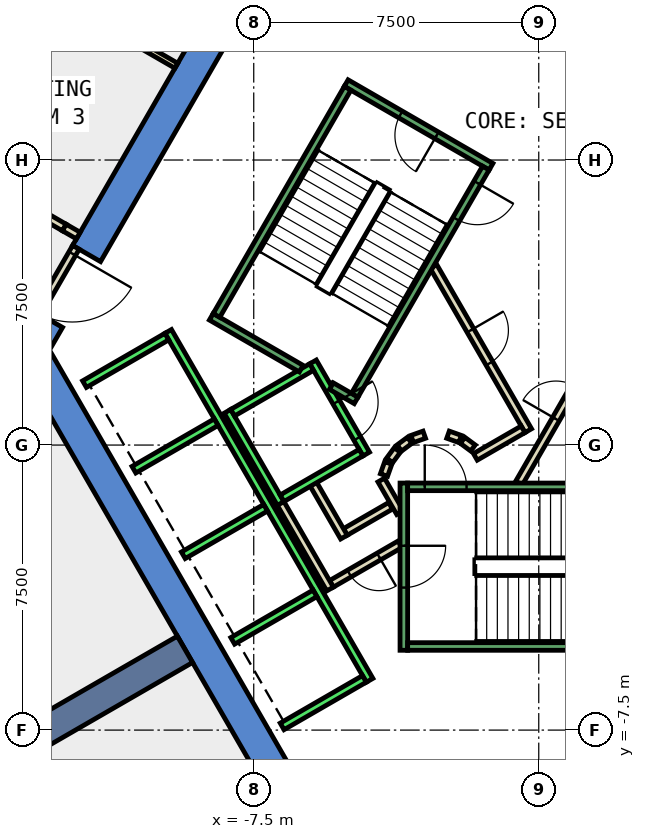
"""IFC4 building model, lengths in metres.
Left out: names, types, materials, properties, quantities, classifications, styles, units other than length and angle.
Written with IfcOpenShell. Run it as: python <this file> out.ifc"""

import sys

from ifc_helpers import new_model, si_unit, direction, frame, frame_2d, origin, place, context, subcontext, project, spatial, polyline, rectangle, outline, extrude, element, fill, save


model = new_model("IFC4")
c1 = context("Model", 3, precision=1e-05, world=origin(), true_north=direction((0.0, 1.0)))
c2 = subcontext(c1, "Body", "Model", "MODEL_VIEW")
j1 = project(units=[si_unit("LENGTHUNIT", "METRE"), si_unit("PLANEANGLEUNIT", "RADIAN")], contexts=[c1])
p1 = place(None, origin())
s1 = spatial("IfcSite", under=j1, at=p1, CompositionType="ELEMENT")
p2 = place(p1, origin())
s2 = spatial("IfcBuilding", under=s1, at=p2, CompositionType="ELEMENT")
p3 = place(p2, frame((0.0, 0.0, 128.6)))
s3 = spatial("IfcBuildingStorey", under=s2, at=p3, CompositionType="ELEMENT", Elevation=128.6)
p4 = place(p3, frame((0.0, 0.0, -0.4)))
e1 = element("IfcWall", 1, at=p4, inside=s3, PredefinedType="SHEAR", context=c2, shape_type="SweptSolid", body=[
    extrude(outline(polyline([(-12.267, 5.252), (-11.531, 4.827), (-6.437, 13.65), (-6.928, 14.5), (-12.267, 5.252)])), origin(), (0.0, 0.0, 1.0), 4.0),
])
p5 = place(p3, frame((0.0, 0.0, -0.4)))
e2 = element("IfcWall", 2, at=p5, inside=s3, PredefinedType="SHEAR", context=c2, shape_type="SweptSolid", body=[
    extrude(outline(polyline([(-12.531, 3.095), (-13.267, 3.52), (-13.856, 2.5), (-12.875, 2.5), (-12.531, 3.095)])), origin(), (0.0, 0.0, 1.0), 4.0),
])
p6 = place(p3, frame((0.0, 0.0, -0.4)))
e3 = element("IfcWall", 3, at=p6, inside=s3, PredefinedType="SHEAR", context=c2, shape_type="SweptSolid", body=[
    extrude(outline(polyline([(-13.856, 2.5), (-6.928, -9.5), (-6.437, -8.65), (-12.875, 2.5), (-13.856, 2.5)])), origin(), (0.0, 0.0, 1.0), 4.0),
])
p7 = place(p3, frame((-9.31, -5.375, -0.4), z_axis=(0.0, 0.0, 1.0), x_axis=(-0.866017533419, -0.500013631625, 0.0)))
e4 = element("IfcWall", 4, at=p7, inside=s3, PredefinedType="SHEAR", context=c2, shape_type="SweptSolid", body=[
    extrude(rectangle(XDim=9.0, YDim=0.8, at=frame_2d((4.5, 0.0))), origin(), (0.0, 0.0, 1.0), 4.0),
])
p8 = place(p3, frame((-16.441, 8.008, 0.0), z_axis=(0.0, 0.0, 1.0), x_axis=(0.866020923391, -0.500007760188, 0.0)))
e5 = element("IfcWall", 5, at=p8, inside=s3, PredefinedType="PARTITIONING", context=c2, shape_type="SweptSolid", body=[
    extrude(rectangle(XDim=4.568, YDim=0.2, at=frame_2d((2.284, 0.0))), origin(), (0.0, 0.0, 1.0), 3.6),
])
p9 = place(p8, frame((1.997, 0.0, 0.0)))
e6 = element("IfcOpeningElement", 6, at=p9, cuts=e5, PredefinedType="OPENING", context=c2, shape_type="SweptSolid", body=[
    extrude(rectangle(XDim=1.0, YDim=2.1, at=frame_2d((0.5, 1.05))), frame((0.0, 0.11, 0.0), z_axis=(0.0, -1.0, 0.0), x_axis=(1.0, 0.0, 0.0)), (0.0, 0.0, 1.0), 0.22),
])
p10 = place(p3, frame((-3.9, -1.599, 0.0), z_axis=(0.0, 0.0, 1.0), x_axis=(-0.865969445389, -0.500096910261, 0.0)))
e7 = element("IfcWall", 7, at=p10, inside=s3, PredefinedType="PARTITIONING", context=c2, shape_type="SweptSolid", body=[
    extrude(rectangle(XDim=1.373, YDim=0.2, at=frame_2d((0.687, 0.0))), origin(), (0.0, 0.0, 1.0), 3.6),
])
p11 = place(p3, frame((-5.126, -2.422, 0.0), z_axis=(0.0, 0.0, 1.0), x_axis=(-0.500062241894, 0.865989465428, 0.0)))
e8 = element("IfcWall", 8, at=p11, inside=s3, PredefinedType="PARTITIONING", context=c2, shape_type="SweptSolid", body=[
    extrude(rectangle(XDim=1.7, YDim=0.2, at=frame_2d((0.85, 0.0))), origin(), (0.0, 0.0, 1.0), 3.6),
])
p12 = place(p3, frame((-3.65, -2.61, 0.0), z_axis=(0.0, 0.0, 1.0), x_axis=(-0.866072462134, -0.499918483688, 0.0)))
e9 = element("IfcWall", 9, at=p12, inside=s3, PredefinedType="PARTITIONING", context=c2, shape_type="SweptSolid", body=[
    extrude(rectangle(XDim=2.084, YDim=0.2, at=frame_2d((1.042, 0.0))), origin(), (0.0, 0.0, 1.0), 3.6),
])
p13 = place(p12, frame((0.642, 0.0, 0.0)))
e10 = element("IfcOpeningElement", 10, at=p13, cuts=e9, PredefinedType="OPENING", context=c2, shape_type="SweptSolid", body=[
    extrude(rectangle(XDim=0.9, YDim=2.1, at=frame_2d((0.45, 1.05))), frame((0.0, 0.11, 0.0), z_axis=(0.0, -1.0, 0.0), x_axis=(1.0, 0.0, 0.0)), (0.0, 0.0, 1.0), 0.22),
])
p14 = place(p3, frame((-5.492, -3.788, 0.0), z_axis=(0.0, 0.0, 1.0), x_axis=(-0.500008949224, 0.866020236886, 0.0)))
e11 = element("IfcWall", 11, at=p14, inside=s3, PredefinedType="PARTITIONING", context=c2, shape_type="SweptSolid", body=[
    extrude(rectangle(XDim=2.68, YDim=0.2, at=frame_2d((1.34, 0.0))), origin(), (0.0, 0.0, 1.0), 3.6),
])
p15 = place(p3, frame((-4.145, -0.92, 0.0), z_axis=(0.0, 0.0, 1.0), x_axis=(0.499743786207, -0.866173278362, 0.0)))
e12 = element("IfcWall", 12, at=p15, inside=s3, PredefinedType="PARTITIONING", context=c2, shape_type="SweptSolid", body=[
    extrude(rectangle(XDim=0.991, YDim=0.2, at=frame_2d((0.495, 0.0))), origin(), (0.0, 0.0, 1.0), 3.6),
])
p16 = place(p3, frame((-9.537, 9.981, 0.0), z_axis=(0.0, 0.0, 1.0), x_axis=(-0.866035377451, 0.499982724704, 0.0)))
e13 = element("IfcWall", 13, at=p16, inside=s3, PredefinedType="PARTITIONING", context=c2, shape_type="SweptSolid", body=[
    extrude(rectangle(XDim=4.98, YDim=0.15, at=frame_2d((2.49, 0.0))), origin(), (0.0, 0.0, 1.0), 3.6),
])
p17 = place(p3, frame((-0.52, -1.0, 0.0), z_axis=(0.0, 0.0, 1.0), x_axis=(0.50011622646, 0.865958290007, 0.0)))
e14 = element("IfcWall", 14, at=p17, inside=s3, PredefinedType="PARTITIONING", context=c2, shape_type="SweptSolid", body=[
    extrude(rectangle(XDim=4.991, YDim=0.2, at=frame_2d((2.496, 0.0))), origin(), (0.0, 0.0, 1.0), 3.6),
])
p18 = place(p17, frame((1.945, 0.0, 0.0)))
e15 = element("IfcOpeningElement", 15, at=p18, cuts=e14, PredefinedType="OPENING", context=c2, shape_type="SweptSolid", body=[
    extrude(rectangle(XDim=1.0, YDim=2.1, at=frame_2d((0.5, 1.05))), frame((0.0, 0.11, 0.0), z_axis=(0.0, -1.0, 0.0), x_axis=(1.0, 0.0, 0.0)), (0.0, 0.0, 1.0), 0.22),
])
p19 = place(p3, frame((-2.771, 4.7, 0.0), z_axis=(0.0, 0.0, 1.0), x_axis=(0.499969479948, -0.866043023828, 0.0)))
e16 = element("IfcWall", 16, at=p19, inside=s3, PredefinedType="PARTITIONING", context=c2, shape_type="SweptSolid", body=[
    extrude(rectangle(XDim=4.99, YDim=0.2, at=frame_2d((2.495, 0.0))), origin(), (0.0, 0.0, 1.0), 3.6),
])
p20 = place(p19, frame((1.945, 0.0, 0.0)))
e17 = element("IfcOpeningElement", 17, at=p20, cuts=e16, PredefinedType="OPENING", context=c2, shape_type="SweptSolid", body=[
    extrude(rectangle(XDim=1.0, YDim=2.1, at=frame_2d((0.5, 1.05))), frame((0.0, 0.11, 0.0), z_axis=(0.0, -1.0, 0.0), x_axis=(1.0, 0.0, 0.0)), (0.0, 0.0, 1.0), 0.22),
])
p21 = place(p3, frame((-0.412, 0.414, 0.0), z_axis=(0.0, 0.0, 1.0), x_axis=(-0.866017369001, -0.500013916395, 0.0)))
e18 = element("IfcWall", 18, at=p21, inside=s3, PredefinedType="PARTITIONING", context=c2, shape_type="SweptSolid", body=[
    extrude(rectangle(XDim=1.45, YDim=0.2, at=frame_2d((0.725, 0.0))), origin(), (0.0, 0.0, 1.0), 3.6),
])
p22 = place(p3, frame((-1.731, -0.077, 0.0), z_axis=(0.0, 0.0, 1.0), x_axis=(-0.804311165252, 0.594208338422, 0.0)))
e19 = element("IfcWall", 19, at=p22, inside=s3, PredefinedType="PARTITIONING", context=c2, shape_type="SweptSolid", body=[
    extrude(rectangle(XDim=0.338, YDim=0.2, at=frame_2d((0.169, 0.0))), origin(), (0.0, 0.0, 1.0), 3.6),
])
p23 = place(p3, frame((-2.07, 0.16, 0.0), z_axis=(0.0, 0.0, 1.0), x_axis=(-0.942199461132, 0.335052496547, 0.0)))
e20 = element("IfcWall", 20, at=p23, inside=s3, PredefinedType="PARTITIONING", context=c2, shape_type="SweptSolid", body=[
    extrude(rectangle(XDim=0.337, YDim=0.2, at=frame_2d((0.169, 0.0))), origin(), (0.0, 0.0, 1.0), 3.6),
])
p24 = place(p3, frame((-3.012, 0.273, 0.0), z_axis=(0.0, 0.0, 1.0), x_axis=(-0.942280615813, -0.334824194261, 0.0)))
e21 = element("IfcWall", 21, at=p24, inside=s3, PredefinedType="PARTITIONING", context=c2, shape_type="SweptSolid", body=[
    extrude(rectangle(XDim=0.338, YDim=0.2, at=frame_2d((0.169, 0.0))), origin(), (0.0, 0.0, 1.0), 3.6),
])
p25 = place(p3, frame((-3.397, 0.124, 0.0), z_axis=(0.0, 0.0, 1.0), x_axis=(-0.804311165252, -0.594208338422, 0.0)))
e22 = element("IfcWall", 22, at=p25, inside=s3, PredefinedType="PARTITIONING", context=c2, shape_type="SweptSolid", body=[
    extrude(rectangle(XDim=0.338, YDim=0.2, at=frame_2d((0.169, 0.0))), origin(), (0.0, 0.0, 1.0), 3.6),
])
p26 = place(p3, frame((-3.723, -0.131, 0.0), z_axis=(0.0, 0.0, 1.0), x_axis=(-0.594675113454, -0.803966112121, 0.0)))
e23 = element("IfcWall", 23, at=p26, inside=s3, PredefinedType="PARTITIONING", context=c2, shape_type="SweptSolid", body=[
    extrude(rectangle(XDim=0.338, YDim=0.2, at=frame_2d((0.169, 0.0))), origin(), (0.0, 0.0, 1.0), 3.6),
])
p27 = place(p3, frame((-3.96, -0.47, 0.0), z_axis=(0.0, 0.0, 1.0), x_axis=(-0.334824194261, -0.942280615813, 0.0)))
e24 = element("IfcWall", 24, at=p27, inside=s3, PredefinedType="PARTITIONING", context=c2, shape_type="SweptSolid", body=[
    extrude(rectangle(XDim=0.338, YDim=0.2, at=frame_2d((0.169, 0.0))), origin(), (0.0, 0.0, 1.0), 3.6),
])
p28 = place(p3, frame((-12.18, 5.202, 0.0), z_axis=(0.0, 0.0, 1.0), x_axis=(-0.50002537861, -0.866010750942, 0.0)))
e25 = element("IfcWall", 25, at=p28, inside=s3, PredefinedType="PARTITIONING", context=c2, shape_type="SweptSolid", body=[
    extrude(rectangle(XDim=2.0, YDim=0.2, at=frame_2d((1.0, 0.0))), origin(), (0.0, 0.0, 1.0), 2.4),
])
p29 = place(p28, frame((0.19, 0.0, 0.0)))
e26 = element("IfcOpeningElement", 26, at=p29, cuts=e25, PredefinedType="OPENING", context=c2, shape_type="SweptSolid", body=[
    extrude(rectangle(XDim=1.8, YDim=2.1, at=frame_2d((0.9, 1.05))), frame((0.0, 0.11, 0.0), z_axis=(0.0, -1.0, 0.0), x_axis=(1.0, 0.0, 0.0)), (0.0, 0.0, 1.0), 0.22),
])
p30 = place(p3, frame((-12.485, 5.724, 0.0), z_axis=(0.0, 0.0, 1.0), x_axis=(0.866434177787, -0.499291313327, 0.0)))
e27 = element("IfcWall", 27, at=p30, inside=s3, PredefinedType="PARTITIONING", context=c2, shape_type="SweptSolid", body=[
    extrude(rectangle(XDim=0.425, YDim=0.2, at=frame_2d((0.212, 0.0))), origin(), (0.0, 0.0, 1.0), 2.4),
])
p31 = place(p3, frame((-5.94, 2.188, 0.0), z_axis=(0.0, 0.0, 1.0), x_axis=(0.49994636267, -0.866056369097, 0.0)))
e28 = element("IfcWall", 28, at=p31, inside=s3, PredefinedType="STANDARD", context=c2, shape_type="SweptSolid", body=[
    extrude(rectangle(XDim=2.8, YDim=0.2, at=frame_2d((1.4, 0.0))), origin(), (0.0, 0.0, 1.0), 3.6),
])
p32 = place(p31, frame((1.225, 0.0, 0.0)))
e29 = element("IfcOpeningElement", 29, at=p32, cuts=e28, PredefinedType="OPENING", context=c2, shape_type="SweptSolid", body=[
    extrude(rectangle(XDim=1.1, YDim=2.1, at=frame_2d((0.55, 1.05))), frame((0.0, 0.11, 0.0), z_axis=(0.0, -1.0, 0.0), x_axis=(1.0, 0.0, 0.0)), (0.0, 0.0, 1.0), 0.22),
])
p33 = place(p3, frame((-8.192, 0.888, 0.0), z_axis=(0.0, 0.0, 1.0), x_axis=(0.49994636267, -0.866056369097, 0.0)))
e30 = element("IfcWall", 30, at=p33, inside=s3, PredefinedType="STANDARD", context=c2, shape_type="SweptSolid", body=[
    extrude(rectangle(XDim=2.8, YDim=0.2, at=frame_2d((1.4, 0.0))), origin(), (0.0, 0.0, 1.0), 3.6),
])
for number, where, z_axis, x_axis in (
    (31, (-5.977, 2.052, 0.0), (0.0, 0.0, 1.0), (-0.866, -0.5, 0.0)),
    (32, (-4.677, -0.2, 0.0), (0.0, 0.0, 1.0), (-0.866, -0.5, 0.0)),
):
    element("IfcWall", number, at=place(p3, frame(where, z_axis=z_axis, x_axis=x_axis)), inside=s3, PredefinedType="STANDARD", context=c2, shape_type="SweptSolid", body=[
        extrude(rectangle(XDim=2.399, YDim=0.2, at=frame_2d((1.2, 0.0))), origin(), (0.0, 0.0, 1.0), 3.6),
    ])
p34 = place(p3, frame((-9.751, 2.99, 0.0), z_axis=(0.0, 0.0, 1.0), x_axis=(0.50000090737, -0.866024879913, 0.0)))
e33 = element("IfcWall", 33, at=p34, inside=s3, PredefinedType="STANDARD", context=c2, shape_type="SweptSolid", body=[
    extrude(rectangle(XDim=10.6, YDim=0.2, at=frame_2d((5.3, 0.0))), origin(), (0.0, 0.0, 1.0), 3.6),
])
p35 = place(p3, frame((-9.788, 2.853, 0.0), z_axis=(0.0, 0.0, 1.0), x_axis=(-0.865998541277, -0.500046524342, 0.0)))
e34 = element("IfcWall", 34, at=p35, inside=s3, PredefinedType="STANDARD", context=c2, shape_type="SweptSolid", body=[
    extrude(rectangle(XDim=2.5, YDim=0.2, at=frame_2d((1.25, 0.0))), origin(), (0.0, 0.0, 1.0), 3.6),
])
for number, where, z_axis, x_axis in (
    (35, (-8.488, 0.602, 0.0), (0.0, 0.0, 1.0), (-0.866, -0.5, 0.0)),
    (36, (-7.188, -1.65, 0.0), (0.0, 0.0, 1.0), (-0.866, -0.5, 0.0)),
    (37, (-5.888, -3.902, 0.0), (0.0, 0.0, 1.0), (-0.866, -0.5, 0.0)),
    (38, (-4.588, -6.153, 0.0), (0.0, 0.0, 1.0), (-0.866, -0.5, 0.0)),
):
    element("IfcWall", number, at=place(p3, frame(where, z_axis=z_axis, x_axis=x_axis)), inside=s3, PredefinedType="STANDARD", context=c2, shape_type="SweptSolid", body=[
        extrude(rectangle(XDim=2.5, YDim=0.2, at=frame_2d((1.25, 0.0))), origin(), (0.0, 0.0, 1.0), 3.6),
    ])
p36 = place(p3, frame((-3.55, -1.0, 0.0), z_axis=(0.0, 0.0, 1.0), x_axis=(0.0, -1.0, 0.0)))
e39 = element("IfcWall", 39, at=p36, inside=s3, PredefinedType="STANDARD", context=c2, shape_type="SweptSolid", body=[
    extrude(rectangle(XDim=4.4, YDim=0.2, at=frame_2d((2.2, 0.0))), origin(), (0.0, 0.0, 1.0), 3.6),
])
p37 = place(p36, frame((1.65, 0.0, 0.0)))
e40 = element("IfcOpeningElement", 40, at=p37, cuts=e39, PredefinedType="OPENING", context=c2, shape_type="SweptSolid", body=[
    extrude(rectangle(XDim=1.1, YDim=2.2, at=frame_2d((0.55, 1.1))), frame((0.0, 0.11, 0.0), z_axis=(0.0, -1.0, 0.0), x_axis=(1.0, 0.0, 0.0)), (0.0, 0.0, 1.0), 0.22),
])
p38 = place(p3, frame((-3.45, -1.1, 0.0), z_axis=(0.0, 0.0, 1.0), x_axis=(1.0, 0.0, 0.0)))
e41 = element("IfcWall", 41, at=p38, inside=s3, PredefinedType="STANDARD", context=c2, shape_type="SweptSolid", body=[
    extrude(rectangle(XDim=6.9, YDim=0.2, at=frame_2d((3.45, 0.0))), origin(), (0.0, 0.0, 1.0), 3.6),
])
p39 = place(p38, frame((0.45, 0.0, 0.0)))
e42 = element("IfcOpeningElement", 42, at=p39, cuts=e41, PredefinedType="OPENING", context=c2, shape_type="SweptSolid", body=[
    extrude(rectangle(XDim=1.1, YDim=2.2, at=frame_2d((0.55, 1.1))), frame((0.0, 0.11, 0.0), z_axis=(0.0, -1.0, 0.0), x_axis=(1.0, 0.0, 0.0)), (0.0, 0.0, 1.0), 0.22),
])
p40 = place(p3, frame((-3.45, -5.3, 0.0), z_axis=(0.0, 0.0, 1.0), x_axis=(1.0, 0.0, 0.0)))
e43 = element("IfcWall", 43, at=p40, inside=s3, PredefinedType="STANDARD", context=c2, shape_type="SweptSolid", body=[
    extrude(rectangle(XDim=6.9, YDim=0.2, at=frame_2d((3.45, 0.0))), origin(), (0.0, 0.0, 1.0), 3.6),
])
p41 = place(p3, frame((-1.256, 7.324, 0.0), z_axis=(0.0, 0.0, 1.0), x_axis=(-0.866046073146, 0.499964197906, 0.0)))
e44 = element("IfcWall", 44, at=p41, inside=s3, PredefinedType="STANDARD", context=c2, shape_type="SweptSolid", body=[
    extrude(rectangle(XDim=4.4, YDim=0.2, at=frame_2d((2.2, 0.0))), origin(), (0.0, 0.0, 1.0), 3.6),
])
p42 = place(p41, frame((1.65, 0.0, 0.0)))
e45 = element("IfcOpeningElement", 45, at=p42, cuts=e44, PredefinedType="OPENING", context=c2, shape_type="SweptSolid", body=[
    extrude(rectangle(XDim=1.1, YDim=2.2, at=frame_2d((0.55, 1.1))), frame((0.0, 0.11, 0.0), z_axis=(0.0, -1.0, 0.0), x_axis=(1.0, 0.0, 0.0)), (0.0, 0.0, 1.0), 0.22),
])
p43 = place(p3, frame((-6.25, 2.01, 0.0), z_axis=(0.0, 0.0, 1.0), x_axis=(-0.86611865017, 0.499838457731, 0.0)))
e46 = element("IfcWall", 46, at=p43, inside=s3, PredefinedType="STANDARD", context=c2, shape_type="SweptSolid", body=[
    extrude(rectangle(XDim=2.733, YDim=0.2, at=frame_2d((1.366, 0.0))), origin(), (0.0, 0.0, 1.0), 3.6),
])
p44 = place(p3, frame((-4.806, 1.176, 0.0), z_axis=(0.0, 0.0, 1.0), x_axis=(-0.866558586415, 0.499075361355, 0.0)))
e47 = element("IfcWall", 47, at=p44, inside=s3, PredefinedType="STANDARD", context=c2, shape_type="SweptSolid", body=[
    extrude(rectangle(XDim=0.751, YDim=0.2, at=frame_2d((0.376, 0.0))), origin(), (0.0, 0.0, 1.0), 3.6),
])
p45 = place(p3, frame((-1.393, 7.288, 0.0), z_axis=(0.0, 0.0, 1.0), x_axis=(-0.499963383562, -0.866046543262, 0.0)))
e48 = element("IfcWall", 48, at=p45, inside=s3, PredefinedType="STANDARD", context=c2, shape_type="SweptSolid", body=[
    extrude(rectangle(XDim=6.9, YDim=0.2, at=frame_2d((3.45, 0.0))), origin(), (0.0, 0.0, 1.0), 3.6),
])
p46 = place(p45, frame((0.45, 0.0, 0.0)))
e49 = element("IfcOpeningElement", 49, at=p46, cuts=e48, PredefinedType="OPENING", context=c2, shape_type="SweptSolid", body=[
    extrude(rectangle(XDim=1.1, YDim=2.2, at=frame_2d((0.55, 1.1))), frame((0.0, 0.11, 0.0), z_axis=(0.0, -1.0, 0.0), x_axis=(1.0, 0.0, 0.0)), (0.0, 0.0, 1.0), 0.22),
])
p47 = place(p3, frame((-5.03, 9.388, 0.0), z_axis=(0.0, 0.0, 1.0), x_axis=(-0.499978703459, -0.866037698999, 0.0)))
e50 = element("IfcWall", 50, at=p47, inside=s3, PredefinedType="STANDARD", context=c2, shape_type="SweptSolid", body=[
    extrude(rectangle(XDim=6.9, YDim=0.2, at=frame_2d((3.45, 0.0))), origin(), (0.0, 0.0, 1.0), 3.6),
])
p48 = place(p18, origin())
e51 = element("IfcDoor", 51, at=p48, inside=s3, OperationType="SINGLE_SWING_LEFT", PredefinedType="DOOR", context=c2, shape_type="SweptSolid", body=[
    extrude(rectangle(XDim=1.0, YDim=2.1, at=frame_2d((0.5, 1.05))), frame((0.0, 0.025, 0.0), z_axis=(0.0, -1.0, 0.0), x_axis=(1.0, 0.0, 0.0)), (0.0, 0.0, 1.0), 0.05),
])
fill(e15, e51)
p49 = place(p20, origin())
e52 = element("IfcDoor", 52, at=p49, inside=s3, OperationType="SINGLE_SWING_RIGHT", PredefinedType="DOOR", context=c2, shape_type="SweptSolid", body=[
    extrude(rectangle(XDim=1.0, YDim=2.1, at=frame_2d((0.5, 1.05))), frame((0.0, 0.025, 0.0), z_axis=(0.0, -1.0, 0.0), x_axis=(1.0, 0.0, 0.0)), (0.0, 0.0, 1.0), 0.05),
])
fill(e17, e52)
p50 = place(p13, origin())
e53 = element("IfcDoor", 53, at=p50, inside=s3, OperationType="SINGLE_SWING_LEFT", PredefinedType="DOOR", context=c2, shape_type="SweptSolid", body=[
    extrude(rectangle(XDim=0.9, YDim=2.1, at=frame_2d((0.45, 1.05))), frame((0.0, 0.025, 0.0), z_axis=(0.0, -1.0, 0.0), x_axis=(1.0, 0.0, 0.0)), (0.0, 0.0, 1.0), 0.05),
])
fill(e10, e53)
p51 = place(p29, origin())
e54 = element("IfcDoor", 54, at=p51, inside=s3, OperationType="DOUBLE_DOOR_SINGLE_SWING", PredefinedType="DOOR", context=c2, shape_type="SweptSolid", body=[
    extrude(rectangle(XDim=1.8, YDim=2.1, at=frame_2d((0.9, 1.05))), frame((0.0, 0.025, 0.0), z_axis=(0.0, -1.0, 0.0), x_axis=(1.0, 0.0, 0.0)), (0.0, 0.0, 1.0), 0.05),
])
fill(e26, e54)
p52 = place(p32, origin())
e55 = element("IfcDoor", 55, at=p52, inside=s3, OperationType="SLIDING_TO_LEFT", PredefinedType="DOOR", context=c2, shape_type="SweptSolid", body=[
    extrude(rectangle(XDim=1.1, YDim=2.1, at=frame_2d((0.55, 1.05))), frame((0.0, 0.025, 0.0), z_axis=(0.0, -1.0, 0.0), x_axis=(1.0, 0.0, 0.0)), (0.0, 0.0, 1.0), 0.05),
])
fill(e29, e55)
p53 = place(p39, origin())
e56 = element("IfcDoor", 56, at=p53, inside=s3, OperationType="SINGLE_SWING_LEFT", PredefinedType="DOOR", context=c2, shape_type="SweptSolid", body=[
    extrude(rectangle(XDim=1.1, YDim=2.2, at=frame_2d((0.55, 1.1))), frame((0.0, 0.025, 0.0), z_axis=(0.0, -1.0, 0.0), x_axis=(1.0, 0.0, 0.0)), (0.0, 0.0, 1.0), 0.05),
])
fill(e42, e56)
p54 = place(p37, origin())
e57 = element("IfcDoor", 57, at=p54, inside=s3, OperationType="SINGLE_SWING_LEFT", PredefinedType="DOOR", context=c2, shape_type="SweptSolid", body=[
    extrude(rectangle(XDim=1.1, YDim=2.2, at=frame_2d((0.55, 1.1))), frame((0.0, 0.025, 0.0), z_axis=(0.0, -1.0, 0.0), x_axis=(1.0, 0.0, 0.0)), (0.0, 0.0, 1.0), 0.05),
])
fill(e40, e57)
p55 = place(p46, origin())
e58 = element("IfcDoor", 58, at=p55, inside=s3, OperationType="SINGLE_SWING_LEFT", PredefinedType="DOOR", context=c2, shape_type="SweptSolid", body=[
    extrude(rectangle(XDim=1.1, YDim=2.2, at=frame_2d((0.55, 1.1))), frame((0.0, 0.025, 0.0), z_axis=(0.0, -1.0, 0.0), x_axis=(1.0, 0.0, 0.0)), (0.0, 0.0, 1.0), 0.05),
])
fill(e49, e58)
p56 = place(p42, origin())
e59 = element("IfcDoor", 59, at=p56, inside=s3, OperationType="SINGLE_SWING_LEFT", PredefinedType="DOOR", context=c2, shape_type="SweptSolid", body=[
    extrude(rectangle(XDim=1.1, YDim=2.2, at=frame_2d((0.55, 1.1))), frame((0.0, 0.025, 0.0), z_axis=(0.0, -1.0, 0.0), x_axis=(1.0, 0.0, 0.0)), (0.0, 0.0, 1.0), 0.05),
])
fill(e45, e59)
save(model, sys.argv[1])
